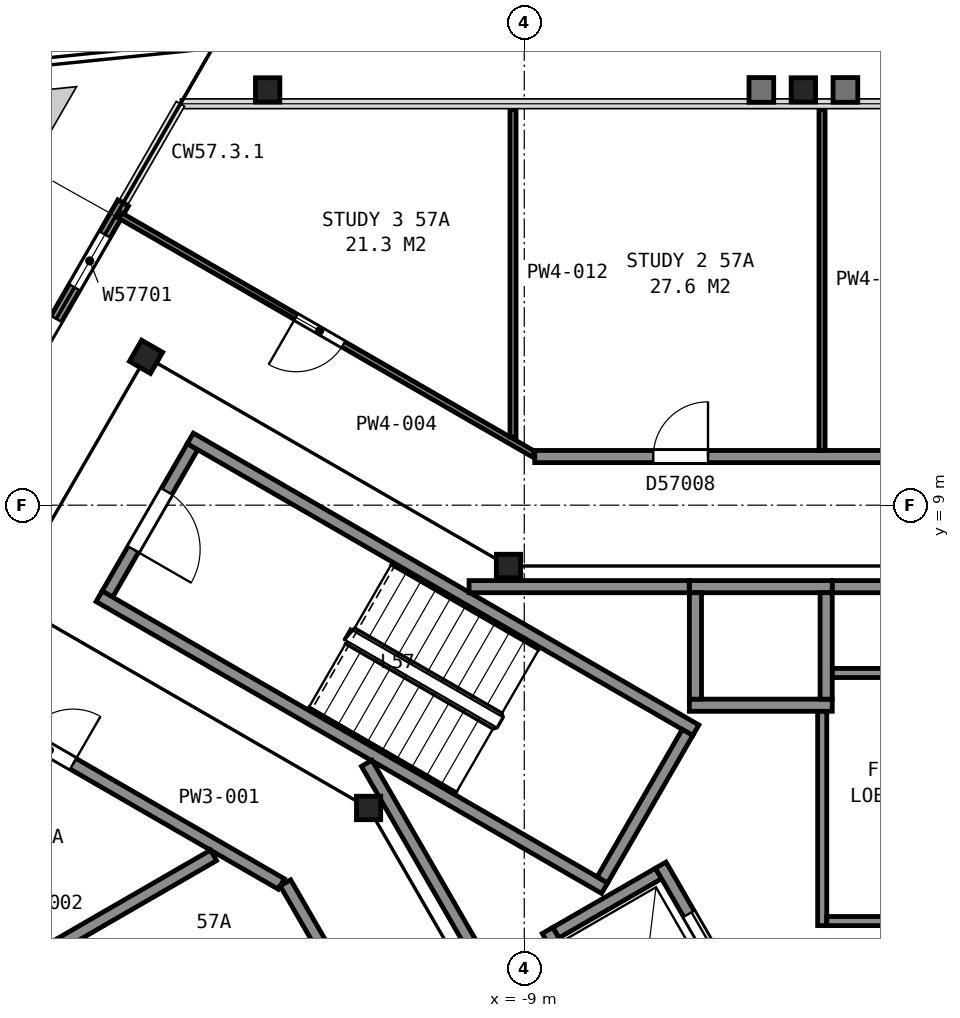
"""IFC4 building model, lengths in metres.
Left out: names, types, materials, properties, quantities, classifications, styles, units other than length and angle.
Written with IfcOpenShell. Run it as: python <this file> out.ifc"""

import sys

from ifc_helpers import new_model, si_unit, direction, frame, frame_2d, origin, origin_2d, place, context, subcontext, project, spatial, rectangle, i_section, extrude, element, fill, save


model = new_model("IFC4")
c1 = context("Model", 3, precision=1e-05, world=origin(), true_north=direction((0.0, 1.0)))
c2 = subcontext(c1, "Body", "Model", "MODEL_VIEW")
j1 = project(units=[si_unit("LENGTHUNIT", "METRE"), si_unit("PLANEANGLEUNIT", "RADIAN")], contexts=[c1])
p1 = place(None, origin())
s1 = spatial("IfcSite", under=j1, at=p1, CompositionType="ELEMENT")
p2 = place(p1, origin())
s2 = spatial("IfcBuilding", under=s1, at=p2, CompositionType="ELEMENT")
p3 = place(p2, frame((0.0, 0.0, 228.6)))
s3 = spatial("IfcBuildingStorey", under=s2, at=p3, CompositionType="ELEMENT", Elevation=228.6)
for number, where, z_axis, x_axis in (
    (1, (-4.41, 15.83, 0.0), (0.0, 0.0, 1.0), (1.0, 0.0, 0.0)),
    (2, (-13.22, 15.83, 0.0), (0.0, 0.0, 1.0), (1.0, 0.0, 0.0)),
):
    element("IfcColumn", number, at=place(p3, frame(where, z_axis=z_axis, x_axis=x_axis)), inside=s3, PredefinedType="COLUMN", context=c2, shape_type="SweptSolid", body=[
        extrude(i_section(OverallWidth=0.401, OverallDepth=0.399, WebThickness=0.025, FlangeThickness=0.04, FilletRadius=0.015, at=origin_2d()), origin(), (0.0, 0.0, 1.0), 3.665),
    ])
p4 = place(p3, frame((-9.26, 8.0, 0.0), z_axis=(0.0, 0.0, 1.0), x_axis=(1.0, 0.0, 0.0)))
e3 = element("IfcColumn", 3, at=p4, inside=s3, PredefinedType="COLUMN", context=c2, shape_type="SweptSolid", body=[
    extrude(i_section(OverallWidth=0.399, OverallDepth=0.386, WebThickness=0.021, FlangeThickness=0.033, FilletRadius=0.015, at=origin_2d()), origin(), (0.0, 0.0, 1.0), 3.7),
])
p5 = place(p3, frame((-15.22, 11.44, 0.0), z_axis=(0.0, 0.0, 1.0), x_axis=(0.5, 0.866025403784, 0.0)))
e4 = element("IfcColumn", 4, at=p5, inside=s3, PredefinedType="COLUMN", context=c2, shape_type="SweptSolid", body=[
    extrude(i_section(OverallWidth=0.401, OverallDepth=0.399, WebThickness=0.025, FlangeThickness=0.04, FilletRadius=0.015, at=origin_2d()), origin(), (0.0, 0.0, 1.0), 3.7),
])
p6 = place(p3, frame((-11.56, 4.02, 0.0), z_axis=(0.0, 0.0, 1.0), x_axis=(1.0, 0.0, 0.0)))
e5 = element("IfcColumn", 5, at=p6, inside=s3, PredefinedType="COLUMN", context=c2, shape_type="SweptSolid", body=[
    extrude(i_section(OverallWidth=0.399, OverallDepth=0.386, WebThickness=0.021, FlangeThickness=0.033, FilletRadius=0.015, at=origin_2d()), origin(), (0.0, 0.0, 1.0), 3.7),
])
p7 = place(p3, frame((-15.597, 13.97, 0.0), z_axis=(0.0, 0.0, 1.0), x_axis=(-0.500007509209, -0.866021068297, 0.0)))
e6 = element("IfcWall", 6, at=p7, inside=s3, PredefinedType="SOLIDWALL", context=c2, shape_type="SweptSolid", body=[
    extrude(rectangle(XDim=8.6, YDim=0.2, at=frame_2d((4.3, 0.0))), origin(), (0.0, 0.0, 1.0), 2.713),
])
p8 = place(p7, frame((0.6, 0.0, 0.9)))
e7 = element("IfcOpeningElement", 7, at=p8, cuts=e6, PredefinedType="OPENING", context=c2, shape_type="SweptSolid", body=[
    extrude(rectangle(XDim=1.0, YDim=1.5, at=frame_2d((0.5, 0.75))), frame((0.0, 0.11, 0.0), z_axis=(0.0, -1.0, 0.0), x_axis=(1.0, 0.0, 0.0)), (0.0, 0.0, 1.0), 0.22),
])
p9 = place(p7, frame((2.2, 0.0, 0.0)))
e8 = element("IfcOpeningElement", 8, at=p9, cuts=e6, PredefinedType="OPENING", context=c2, shape_type="SweptSolid", body=[
    extrude(rectangle(XDim=1.8, YDim=2.4, at=frame_2d((0.9, 1.2))), frame((0.0, 0.11, 0.0), z_axis=(0.0, -1.0, 0.0), x_axis=(1.0, 0.0, 0.0)), (0.0, 0.0, 1.0), 0.22),
])
p10 = place(p7, frame((4.6, 0.0, 0.0)))
e9 = element("IfcOpeningElement", 9, at=p10, cuts=e6, PredefinedType="OPENING", context=c2, shape_type="SweptSolid", body=[
    extrude(rectangle(XDim=1.8, YDim=2.4, at=frame_2d((0.9, 1.2))), frame((0.0, 0.11, 0.0), z_axis=(0.0, -1.0, 0.0), x_axis=(1.0, 0.0, 0.0)), (0.0, 0.0, 1.0), 0.22),
])
p11 = place(p7, frame((7.0, 0.0, 0.9)))
e10 = element("IfcOpeningElement", 10, at=p11, cuts=e6, PredefinedType="OPENING", context=c2, shape_type="SweptSolid", body=[
    extrude(rectangle(XDim=1.0, YDim=1.5, at=frame_2d((0.5, 0.75))), frame((0.0, 0.11, 0.0), z_axis=(0.0, -1.0, 0.0), x_axis=(1.0, 0.0, 0.0)), (0.0, 0.0, 1.0), 0.22),
])
p12 = place(p3, frame((-14.455, 9.962, 0.0), z_axis=(0.0, 0.0, 1.0), x_axis=(-0.500049511043, -0.865996816683, 0.0)))
e11 = element("IfcWall", 11, at=p12, inside=s3, PredefinedType="PARTITIONING", context=c2, shape_type="SweptSolid", body=[
    extrude(rectangle(XDim=2.8, YDim=0.2, at=frame_2d((1.4, 0.0))), origin(), (0.0, 0.0, 1.0), 3.45),
])
p13 = place(p12, frame((0.85, 0.0, 0.0)))
e12 = element("IfcOpeningElement", 12, at=p13, cuts=e11, PredefinedType="OPENING", context=c2, shape_type="SweptSolid", body=[
    extrude(rectangle(XDim=1.1, YDim=2.1, at=frame_2d((0.55, 1.05))), frame((0.0, 0.11, 0.0), z_axis=(0.0, -1.0, 0.0), x_axis=(1.0, 0.0, 0.0)), (0.0, 0.0, 1.0), 0.22),
])
for number, where, z_axis, x_axis in (
    (13, (-7.678, 2.701, 0.0), (0.0, 0.0, 1.0), (-0.866, 0.5, 0.0)),
    (14, (-6.178, 5.299, 0.0), (0.0, 0.0, 1.0), (-0.866, 0.5, 0.0)),
):
    element("IfcWall", number, at=place(p3, frame(where, z_axis=z_axis, x_axis=x_axis)), inside=s3, PredefinedType="PARTITIONING", context=c2, shape_type="SweptSolid", body=[
        extrude(rectangle(XDim=9.6, YDim=0.2, at=frame_2d((4.8, 0.0))), origin(), (0.0, 0.0, 1.0), 3.45),
    ])
p14 = place(p3, frame((-6.315, 5.262, 0.0), z_axis=(0.0, 0.0, 1.0), x_axis=(-0.500049511043, -0.865996816683, 0.0)))
e15 = element("IfcWall", 15, at=p14, inside=s3, PredefinedType="PARTITIONING", context=c2, shape_type="SweptSolid", body=[
    extrude(rectangle(XDim=2.8, YDim=0.2, at=frame_2d((1.4, 0.0))), origin(), (0.0, 0.0, 1.0), 3.45),
])
for number, where, z_axis, x_axis in (
    (16, (-6.285, 5.71, 0.0), (0.0, 0.0, 1.0), (1.0, 0.0, 0.0)),
    (17, (-6.285, 7.66, 0.0), (0.0, 0.0, 1.0), (1.0, 0.0, 0.0)),
):
    element("IfcWall", number, at=place(p3, frame(where, z_axis=z_axis, x_axis=x_axis)), inside=s3, PredefinedType="PARTITIONING", context=c2, shape_type="SweptSolid", body=[
        extrude(rectangle(XDim=2.35, YDim=0.2, at=frame_2d((1.175, 0.0))), origin(), (0.0, 0.0, 1.0), 3.7),
    ])
p15 = place(p3, frame((-8.48, 1.969, 0.0), z_axis=(0.0, 0.0, 1.0), x_axis=(0.866000020948, 0.500043961785, 0.0)))
e18 = element("IfcWall", 18, at=p15, inside=s3, PredefinedType="PARTITIONING", context=c2, shape_type="SweptSolid", body=[
    extrude(rectangle(XDim=1.95, YDim=0.2, at=frame_2d((0.975, 0.0))), origin(), (0.0, 0.0, 1.0), 3.7),
])
for number, where, z_axis, x_axis in (
    (19, (-4.035, 5.81, 0.0), (0.0, 0.0, 1.0), (0.0, 1.0, 0.0)),
    (20, (-6.185, 5.81, 0.0), (0.0, 0.0, 1.0), (0.0, 1.0, 0.0)),
):
    element("IfcWall", number, at=place(p3, frame(where, z_axis=z_axis, x_axis=x_axis)), inside=s3, PredefinedType="PARTITIONING", context=c2, shape_type="SweptSolid", body=[
        extrude(rectangle(XDim=1.75, YDim=0.2, at=frame_2d((0.875, 0.0))), origin(), (0.0, 0.0, 1.0), 3.7),
    ])
p16 = place(p3, frame((-5.28, 0.525, 0.0), z_axis=(0.0, 0.0, 1.0), x_axis=(-0.500037662692, 0.866003658127, 0.0)))
e21 = element("IfcWall", 21, at=p16, inside=s3, PredefinedType="PARTITIONING", context=c2, shape_type="SweptSolid", body=[
    extrude(rectangle(XDim=2.95, YDim=0.2, at=frame_2d((1.475, 0.0))), origin(), (0.0, 0.0, 1.0), 3.7),
])
p17 = place(p16, frame((0.925, 0.0, 0.0)))
e22 = element("IfcOpeningElement", 22, at=p17, cuts=e21, PredefinedType="OPENING", context=c2, shape_type="SweptSolid", body=[
    extrude(rectangle(XDim=1.1, YDim=2.1, at=frame_2d((0.55, 1.05))), frame((0.0, 0.11, 0.0), z_axis=(0.0, -1.0, 0.0), x_axis=(1.0, 0.0, 0.0)), (0.0, 0.0, 1.0), 0.22),
])
p18 = place(p3, frame((-7.242, -0.376, 0.0), z_axis=(0.0, 0.0, 1.0), x_axis=(-0.499996545922, 0.866027397988, 0.0)))
e23 = element("IfcWall", 23, at=p18, inside=s3, PredefinedType="PARTITIONING", context=c2, shape_type="SweptSolid", body=[
    extrude(rectangle(XDim=2.75, YDim=0.2, at=frame_2d((1.375, 0.0))), origin(), (0.0, 0.0, 1.0), 3.7),
])
p19 = place(p3, frame((-11.591, 4.755, 0.0), z_axis=(0.0, 0.0, 1.0), x_axis=(0.500043977787, -0.866000011708, 0.0)))
e24 = element("IfcWall", 24, at=p19, inside=s3, PredefinedType="PARTITIONING", context=c2, shape_type="SweptSolid", body=[
    extrude(rectangle(XDim=6.617, YDim=0.2, at=frame_2d((3.308, 0.0))), origin(), (0.0, 0.0, 1.0), 3.45),
])
p20 = place(p19, frame((3.695, 0.0, 0.0)))
e25 = element("IfcOpeningElement", 25, at=p20, cuts=e24, PredefinedType="OPENING", context=c2, shape_type="SweptSolid", body=[
    extrude(rectangle(XDim=1.8, YDim=2.1, at=frame_2d((0.9, 1.05))), frame((0.0, 0.11, 0.0), z_axis=(0.0, -1.0, 0.0), x_axis=(1.0, 0.0, 0.0)), (0.0, 0.0, 1.0), 0.22),
])
p21 = place(p3, frame((-9.908, 7.66, 0.0), z_axis=(0.0, 0.0, 1.0), x_axis=(1.0, 0.0, 0.0)))
e26 = element("IfcWall", 26, at=p21, inside=s3, PredefinedType="PARTITIONING", context=c2, shape_type="SweptSolid", body=[
    extrude(rectangle(XDim=3.621, YDim=0.2, at=frame_2d((1.811, 0.0))), origin(), (0.0, 0.0, 1.0), 3.45),
])
p22 = place(p3, frame((-4.1, 2.085, 0.0), z_axis=(0.0, 0.0, 1.0), x_axis=(0.0, 1.0, 0.0)))
e27 = element("IfcWall", 27, at=p22, inside=s3, PredefinedType="PARTITIONING", context=c2, shape_type="SweptSolid", body=[
    extrude(rectangle(XDim=3.523, YDim=0.15, at=frame_2d((1.761, 0.0))), origin(), (0.0, 0.0, 1.0), 3.45),
])
p23 = place(p3, frame((-4.025, 2.16, 0.0), z_axis=(0.0, 0.0, 1.0), x_axis=(1.0, 0.0, 0.0)))
e28 = element("IfcWall", 28, at=p23, inside=s3, PredefinedType="PARTITIONING", context=c2, shape_type="SweptSolid", body=[
    extrude(rectangle(XDim=1.238, YDim=0.15, at=frame_2d((0.619, 0.0))), origin(), (0.0, 0.0, 1.0), 3.45),
])
p24 = place(p3, frame((-3.933, 6.24, 0.0), z_axis=(0.0, 0.0, 1.0), x_axis=(1.0, 0.0, 0.0)))
e29 = element("IfcWall", 29, at=p24, inside=s3, PredefinedType="PARTITIONING", context=c2, shape_type="SweptSolid", body=[
    extrude(rectangle(XDim=3.538, YDim=0.15, at=frame_2d((1.769, 0.0))), origin(), (0.0, 0.0, 1.0), 3.45),
])
p25 = place(p24, frame((1.3, 0.0, 0.0)))
e30 = element("IfcOpeningElement", 30, at=p25, cuts=e29, PredefinedType="OPENING", context=c2, shape_type="SweptSolid", body=[
    extrude(rectangle(XDim=1.0, YDim=2.1, at=frame_2d((0.5, 1.05))), frame((0.0, 0.085, 0.0), z_axis=(0.0, -1.0, 0.0), x_axis=(1.0, 0.0, 0.0)), (0.0, 0.0, 1.0), 0.17),
])
p26 = place(p3, frame((-3.933, 7.66, 0.0), z_axis=(0.0, 0.0, 1.0), x_axis=(1.0, 0.0, 0.0)))
e31 = element("IfcWall", 31, at=p26, inside=s3, PredefinedType="PARTITIONING", context=c2, shape_type="SweptSolid", body=[
    extrude(rectangle(XDim=13.841, YDim=0.2, at=frame_2d((6.92, 0.0))), origin(), (0.0, 0.0, 1.0), 3.45),
])
p27 = place(p3, frame((-12.995, 2.77, 0.0), z_axis=(0.0, 0.0, 1.0), x_axis=(-0.866060835767, 0.499938624983, 0.0)))
e32 = element("IfcWall", 32, at=p27, inside=s3, PredefinedType="PARTITIONING", context=c2, shape_type="SweptSolid", body=[
    extrude(rectangle(XDim=7.789, YDim=0.2, at=frame_2d((3.894, 0.0))), origin(), (0.0, 0.0, 1.0), 2.713),
])
p28 = place(p27, frame((3.954, 0.0, 0.0)))
e33 = element("IfcOpeningElement", 33, at=p28, cuts=e32, PredefinedType="OPENING", context=c2, shape_type="SweptSolid", body=[
    extrude(rectangle(XDim=0.9, YDim=2.1, at=frame_2d((0.45, 1.05))), frame((0.0, 0.11, 0.0), z_axis=(0.0, -1.0, 0.0), x_axis=(1.0, 0.0, 0.0)), (0.0, 0.0, 1.0), 0.22),
])
p29 = place(p3, frame((-18.359, 0.787, 0.0), z_axis=(0.0, 0.0, 1.0), x_axis=(0.86596515875, 0.500104332946, 0.0)))
e34 = element("IfcWall", 34, at=p29, inside=s3, PredefinedType="PARTITIONING", context=c2, shape_type="SweptSolid", body=[
    extrude(rectangle(XDim=4.907, YDim=0.2, at=frame_2d((2.453, 0.0))), origin(), (0.0, 0.0, 1.0), 2.713),
])
p30 = place(p3, frame((-15.642, 13.762, 0.0), z_axis=(0.0, 0.0, 1.0), x_axis=(0.866090699522, -0.499886887406, 0.0)))
e35 = element("IfcWall", 35, at=p30, inside=s3, PredefinedType="PARTITIONING", context=c2, shape_type="SweptSolid", body=[
    extrude(rectangle(XDim=7.84, YDim=0.1, at=frame_2d((3.92, 0.0))), origin(), (0.0, 0.0, 1.0), 2.713),
])
p31 = place(p30, frame((3.335, 0.0, 0.0)))
e36 = element("IfcOpeningElement", 36, at=p31, cuts=e35, PredefinedType="OPENING", context=c2, shape_type="SweptSolid", body=[
    extrude(rectangle(XDim=0.9, YDim=2.1, at=frame_2d((0.45, 1.05))), frame((0.0, 0.06, 0.0), z_axis=(0.0, -1.0, 0.0), x_axis=(1.0, 0.0, 0.0)), (0.0, 0.0, 1.0), 0.12),
])
p32 = place(p3, frame((-4.075, -12.545, 0.0), z_axis=(0.0, 0.0, 1.0), x_axis=(-0.499997769292, 0.86602669168, 0.0)))
e37 = element("IfcWall", 37, at=p32, inside=s3, PredefinedType="PARTITIONING", context=c2, shape_type="SweptSolid", body=[
    extrude(rectangle(XDim=17.706, YDim=0.2, at=frame_2d((8.853, 0.0))), origin(), (0.0, 0.0, 1.0), 2.713),
])
p33 = place(p32, frame((14.138, 0.0, 0.0)))
e38 = element("IfcOpeningElement", 38, at=p33, cuts=e37, PredefinedType="OPENING", context=c2, shape_type="SweptSolid", body=[
    extrude(rectangle(XDim=0.9, YDim=2.1, at=frame_2d((0.45, 1.05))), frame((0.0, 0.11, 0.0), z_axis=(0.0, -1.0, 0.0), x_axis=(1.0, 0.0, 0.0)), (0.0, 0.0, 1.0), 0.22),
])
p34 = place(p32, frame((11.328, 0.0, 0.0)))
e39 = element("IfcOpeningElement", 39, at=p34, cuts=e37, PredefinedType="OPENING", context=c2, shape_type="SweptSolid", body=[
    extrude(rectangle(XDim=0.9, YDim=2.1, at=frame_2d((0.45, 1.05))), frame((0.0, 0.11, 0.0), z_axis=(0.0, -1.0, 0.0), x_axis=(1.0, 0.0, 0.0)), (0.0, 0.0, 1.0), 0.22),
])
p35 = place(p32, frame((5.454, 0.0, 0.0)))
e40 = element("IfcOpeningElement", 40, at=p35, cuts=e37, PredefinedType="OPENING", context=c2, shape_type="SweptSolid", body=[
    extrude(rectangle(XDim=0.9, YDim=2.1, at=frame_2d((0.45, 1.05))), frame((0.0, 0.11, 0.0), z_axis=(0.0, -1.0, 0.0), x_axis=(1.0, 0.0, 0.0)), (0.0, 0.0, 1.0), 0.22),
])
p36 = place(p32, frame((1.255, 0.0, 0.0)))
e41 = element("IfcOpeningElement", 41, at=p36, cuts=e37, PredefinedType="OPENING", context=c2, shape_type="SweptSolid", body=[
    extrude(rectangle(XDim=0.9, YDim=2.1, at=frame_2d((0.45, 1.05))), frame((0.0, 0.11, 0.0), z_axis=(0.0, -1.0, 0.0), x_axis=(1.0, 0.0, 0.0)), (0.0, 0.0, 1.0), 0.22),
])
p37 = place(p3, frame((-9.185, 10.122, 0.0), z_axis=(0.0, 0.0, 1.0), x_axis=(0.0, 1.0, 0.0)))
e42 = element("IfcWall", 42, at=p37, inside=s3, PredefinedType="PARTITIONING", context=c2, shape_type="SweptSolid", body=[
    extrude(rectangle(XDim=5.385, YDim=0.1, at=frame_2d((2.692, 0.0))), origin(), (0.0, 0.0, 1.0), 2.713),
])
p38 = place(p3, frame((-8.828, 9.8, 0.0), z_axis=(0.0, 0.0, 1.0), x_axis=(1.0, 0.0, 0.0)))
e43 = element("IfcWall", 43, at=p38, inside=s3, PredefinedType="PARTITIONING", context=c2, shape_type="SweptSolid", body=[
    extrude(rectangle(XDim=17.656, YDim=0.2, at=frame_2d((8.828, 0.0))), origin(), (0.0, 0.0, 1.0), 2.713),
])
p39 = place(p38, frame((10.658, 0.0, 0.0)))
e44 = element("IfcOpeningElement", 44, at=p39, cuts=e43, PredefinedType="OPENING", context=c2, shape_type="SweptSolid", body=[
    extrude(rectangle(XDim=0.9, YDim=2.1, at=frame_2d((0.45, 1.05))), frame((0.0, 0.11, 0.0), z_axis=(0.0, -1.0, 0.0), x_axis=(1.0, 0.0, 0.0)), (0.0, 0.0, 1.0), 0.22),
])
p40 = place(p38, frame((6.825, 0.0, 0.0)))
e45 = element("IfcOpeningElement", 45, at=p40, cuts=e43, PredefinedType="OPENING", context=c2, shape_type="SweptSolid", body=[
    extrude(rectangle(XDim=0.9, YDim=2.1, at=frame_2d((0.45, 1.05))), frame((0.0, 0.11, 0.0), z_axis=(0.0, -1.0, 0.0), x_axis=(1.0, 0.0, 0.0)), (0.0, 0.0, 1.0), 0.22),
])
p41 = place(p38, frame((1.95, 0.0, 0.0)))
e46 = element("IfcOpeningElement", 46, at=p41, cuts=e43, PredefinedType="OPENING", context=c2, shape_type="SweptSolid", body=[
    extrude(rectangle(XDim=0.9, YDim=2.1, at=frame_2d((0.45, 1.05))), frame((0.0, 0.11, 0.0), z_axis=(0.0, -1.0, 0.0), x_axis=(1.0, 0.0, 0.0)), (0.0, 0.0, 1.0), 0.22),
])
p42 = place(p3, frame((-4.103, 9.9, 0.0), z_axis=(0.0, 0.0, 1.0), x_axis=(0.0, 1.0, 0.0)))
e47 = element("IfcWall", 47, at=p42, inside=s3, PredefinedType="PARTITIONING", context=c2, shape_type="SweptSolid", body=[
    extrude(rectangle(XDim=5.606, YDim=0.1, at=frame_2d((2.803, 0.0))), origin(), (0.0, 0.0, 1.0), 2.713),
])
p43 = place(p8, origin())
e48 = element("IfcWindow", 48, at=p43, inside=s3, PartitioningType="SINGLE_PANEL", PredefinedType="WINDOW", context=c2, shape_type="SweptSolid", body=[
    extrude(rectangle(XDim=1.0, YDim=1.5, at=frame_2d((0.5, 0.75))), frame((0.0, 0.03, 0.0), z_axis=(0.0, -1.0, 0.0), x_axis=(1.0, 0.0, 0.0)), (0.0, 0.0, 1.0), 0.06),
])
fill(e7, e48)
p44 = place(p9, frame((1.8, 0.0, 0.0), z_axis=(0.0, 0.0, 1.0), x_axis=(-1.0, 0.0, 0.0)))
e49 = element("IfcDoor", 49, at=p44, inside=s3, OperationType="DOUBLE_DOOR_SINGLE_SWING", PredefinedType="DOOR", context=c2, shape_type="SweptSolid", body=[
    extrude(rectangle(XDim=1.8, YDim=2.4, at=frame_2d((0.9, 1.2))), frame((0.0, 0.025, 0.0), z_axis=(0.0, -1.0, 0.0), x_axis=(1.0, 0.0, 0.0)), (0.0, 0.0, 1.0), 0.05),
])
fill(e8, e49)
p45 = place(p13, origin())
e50 = element("IfcDoor", 50, at=p45, inside=s3, OperationType="SINGLE_SWING_RIGHT", PredefinedType="DOOR", context=c2, shape_type="SweptSolid", body=[
    extrude(rectangle(XDim=1.1, YDim=2.1, at=frame_2d((0.55, 1.05))), frame((0.0, 0.025, 0.0), z_axis=(0.0, -1.0, 0.0), x_axis=(1.0, 0.0, 0.0)), (0.0, 0.0, 1.0), 0.05),
])
fill(e12, e50)
p46 = place(p17, origin())
e51 = element("IfcDoor", 51, at=p46, inside=s3, OperationType="SLIDING_TO_LEFT", PredefinedType="DOOR", context=c2, shape_type="SweptSolid", body=[
    extrude(rectangle(XDim=1.1, YDim=2.1, at=frame_2d((0.55, 1.05))), frame((0.0, 0.025, 0.0), z_axis=(0.0, -1.0, 0.0), x_axis=(1.0, 0.0, 0.0)), (0.0, 0.0, 1.0), 0.05),
])
fill(e22, e51)
p47 = place(p28, origin())
e52 = element("IfcDoor", 52, at=p47, inside=s3, OperationType="SINGLE_SWING_LEFT", PredefinedType="DOOR", context=c2, shape_type="SweptSolid", body=[
    extrude(rectangle(XDim=0.9, YDim=2.1, at=frame_2d((0.45, 1.05))), frame((0.0, 0.025, 0.0), z_axis=(0.0, -1.0, 0.0), x_axis=(1.0, 0.0, 0.0)), (0.0, 0.0, 1.0), 0.05),
])
fill(e33, e52)
p48 = place(p31, origin())
e53 = element("IfcDoor", 53, at=p48, inside=s3, OperationType="SINGLE_SWING_LEFT", PredefinedType="DOOR", context=c2, shape_type="SweptSolid", body=[
    extrude(rectangle(XDim=0.9, YDim=2.1, at=frame_2d((0.45, 1.05))), frame((0.0, 0.025, 0.0), z_axis=(0.0, -1.0, 0.0), x_axis=(1.0, 0.0, 0.0)), (0.0, 0.0, 1.0), 0.05),
])
fill(e36, e53)
p49 = place(p41, origin())
e54 = element("IfcDoor", 54, at=p49, inside=s3, OperationType="SINGLE_SWING_RIGHT", PredefinedType="DOOR", context=c2, shape_type="SweptSolid", body=[
    extrude(rectangle(XDim=0.9, YDim=2.1, at=frame_2d((0.45, 1.05))), frame((0.0, 0.025, 0.0), z_axis=(0.0, -1.0, 0.0), x_axis=(1.0, 0.0, 0.0)), (0.0, 0.0, 1.0), 0.05),
])
fill(e46, e54)
save(model, sys.argv[1])
